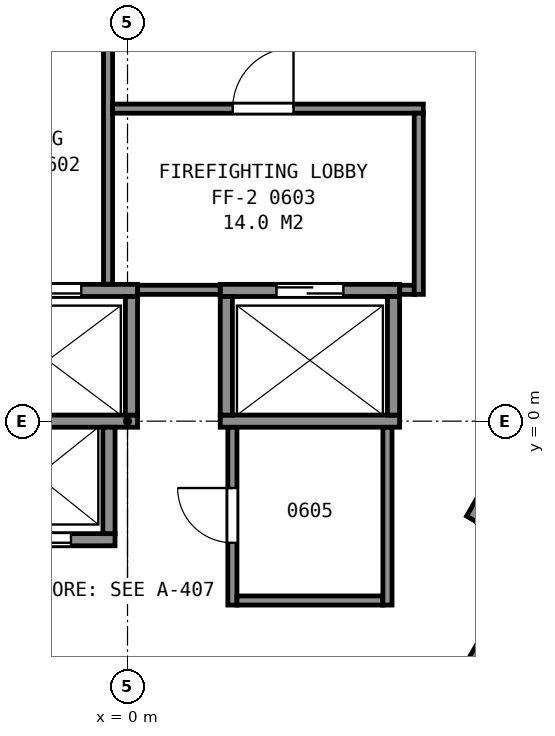
"""IFC4 building model, lengths in metres.
Left out: names, types, materials, properties, quantities, classifications, styles, units other than length and angle.
Written with IfcOpenShell. Run it as: python <this file> out.ifc"""

import sys

from ifc_helpers import new_model, si_unit, direction, frame, frame_2d, origin, place, context, subcontext, project, spatial, rectangle, extrude, element, fill, save


model = new_model("IFC4")
c1 = context("Model", 3, precision=1e-05, world=origin(), true_north=direction((0.0, 1.0)))
c2 = subcontext(c1, "Body", "Model", "MODEL_VIEW")
j1 = project(units=[si_unit("LENGTHUNIT", "METRE"), si_unit("PLANEANGLEUNIT", "RADIAN")], contexts=[c1])
p1 = place(None, origin())
s1 = spatial("IfcSite", under=j1, at=p1, CompositionType="ELEMENT")
p2 = place(p1, origin())
s2 = spatial("IfcBuilding", under=s1, at=p2, CompositionType="ELEMENT")
p3 = place(p2, frame((0.0, 0.0, 36.8)))
s3 = spatial("IfcBuildingStorey", under=s2, at=p3, CompositionType="ELEMENT", Elevation=36.8)
p4 = place(p3, frame((-2.755, -1.95, 0.0), z_axis=(0.0, 0.0, 1.0), x_axis=(1.0, 0.0, 0.0)))
e1 = element("IfcWall", 1, at=p4, inside=s3, PredefinedType="PARTITIONING", context=c2, shape_type="SweptSolid", body=[
    extrude(rectangle(XDim=2.55, YDim=0.2, at=frame_2d((1.275, 0.0))), origin(), (0.0, 0.0, 1.0), 3.6),
])
p5 = place(p4, frame((0.725, 0.0, 0.0)))
e2 = element("IfcOpeningElement", 2, at=p5, cuts=e1, PredefinedType="OPENING", context=c2, shape_type="SweptSolid", body=[
    extrude(rectangle(XDim=1.1, YDim=2.1, at=frame_2d((0.55, 1.05))), frame((0.0, 0.11, 0.0), z_axis=(0.0, -1.0, 0.0), x_axis=(1.0, 0.0, 0.0)), (0.0, 0.0, 1.0), 0.22),
])
p6 = place(p3, frame((-2.785, 0.0, 0.0), z_axis=(0.0, 0.0, 1.0), x_axis=(1.0, 0.0, 0.0)))
e3 = element("IfcWall", 3, at=p6, inside=s3, PredefinedType="PARTITIONING", context=c2, shape_type="SweptSolid", body=[
    extrude(rectangle(XDim=2.95, YDim=0.2, at=frame_2d((1.475, 0.0))), origin(), (0.0, 0.0, 1.0), 3.6),
])
p7 = place(p3, frame((1.525, 0.0, 0.0), z_axis=(0.0, 0.0, 1.0), x_axis=(1.0, 0.0, 0.0)))
e4 = element("IfcWall", 4, at=p7, inside=s3, PredefinedType="PARTITIONING", context=c2, shape_type="SweptSolid", body=[
    extrude(rectangle(XDim=2.95, YDim=0.2, at=frame_2d((1.475, 0.0))), origin(), (0.0, 0.0, 1.0), 3.6),
])
p8 = place(p3, frame((-2.785, 2.15, 0.0), z_axis=(0.0, 0.0, 1.0), x_axis=(1.0, 0.0, 0.0)))
e5 = element("IfcWall", 5, at=p8, inside=s3, PredefinedType="PARTITIONING", context=c2, shape_type="SweptSolid", body=[
    extrude(rectangle(XDim=2.95, YDim=0.2, at=frame_2d((1.475, 0.0))), origin(), (0.0, 0.0, 1.0), 3.6),
])
p9 = place(p8, frame((0.925, 0.0, 0.0)))
e6 = element("IfcOpeningElement", 6, at=p9, cuts=e5, PredefinedType="OPENING", context=c2, shape_type="SweptSolid", body=[
    extrude(rectangle(XDim=1.1, YDim=2.1, at=frame_2d((0.55, 1.05))), frame((0.0, 0.11, 0.0), z_axis=(0.0, -1.0, 0.0), x_axis=(1.0, 0.0, 0.0)), (0.0, 0.0, 1.0), 0.22),
])
p10 = place(p3, frame((1.525, 2.15, 0.0), z_axis=(0.0, 0.0, 1.0), x_axis=(1.0, 0.0, 0.0)))
e7 = element("IfcWall", 7, at=p10, inside=s3, PredefinedType="PARTITIONING", context=c2, shape_type="SweptSolid", body=[
    extrude(rectangle(XDim=2.95, YDim=0.2, at=frame_2d((1.475, 0.0))), origin(), (0.0, 0.0, 1.0), 3.6),
])
p11 = place(p10, frame((0.925, 0.0, 0.0)))
e8 = element("IfcOpeningElement", 8, at=p11, cuts=e7, PredefinedType="OPENING", context=c2, shape_type="SweptSolid", body=[
    extrude(rectangle(XDim=1.1, YDim=2.1, at=frame_2d((0.55, 1.05))), frame((0.0, 0.11, 0.0), z_axis=(0.0, -1.0, 0.0), x_axis=(1.0, 0.0, 0.0)), (0.0, 0.0, 1.0), 0.22),
])
p12 = place(p3, frame((5.527, -4.247, 0.0), z_axis=(0.0, 0.0, 1.0), x_axis=(0.499938297808, 0.866061024631, 0.0)))
e9 = element("IfcWall", 9, at=p12, inside=s3, PredefinedType="PARTITIONING", context=c2, shape_type="SweptSolid", body=[
    extrude(rectangle(XDim=2.35, YDim=0.2, at=frame_2d((1.175, 0.0))), origin(), (0.0, 0.0, 1.0), 3.6),
])
p13 = place(p12, frame((0.725, 0.0, 0.0)))
e10 = element("IfcOpeningElement", 10, at=p13, cuts=e9, PredefinedType="OPENING", context=c2, shape_type="SweptSolid", body=[
    extrude(rectangle(XDim=1.1, YDim=2.1, at=frame_2d((0.55, 1.05))), frame((0.0, 0.11, 0.0), z_axis=(0.0, -1.0, 0.0), x_axis=(1.0, 0.0, 0.0)), (0.0, 0.0, 1.0), 0.22),
])
p14 = place(p3, frame((5.663, -1.612, 0.0), z_axis=(0.0, 0.0, 1.0), x_axis=(0.49998122708, 0.866036242063, 0.0)))
e11 = element("IfcWall", 11, at=p14, inside=s3, PredefinedType="PARTITIONING", context=c2, shape_type="SweptSolid", body=[
    extrude(rectangle(XDim=4.9, YDim=0.2, at=frame_2d((2.45, 0.0))), origin(), (0.0, 0.0, 1.0), 3.6),
])
p15 = place(p14, frame((3.075, 0.0, 0.0)))
e12 = element("IfcOpeningElement", 12, at=p15, cuts=e11, PredefinedType="OPENING", context=c2, shape_type="SweptSolid", body=[
    extrude(rectangle(XDim=1.1, YDim=2.1, at=frame_2d((0.55, 1.05))), frame((0.0, 0.11, 0.0), z_axis=(0.0, -1.0, 0.0), x_axis=(1.0, 0.0, 0.0)), (0.0, 0.0, 1.0), 0.22),
])
p16 = place(p14, frame((0.725, 0.0, 0.0)))
e13 = element("IfcOpeningElement", 13, at=p16, cuts=e11, PredefinedType="OPENING", context=c2, shape_type="SweptSolid", body=[
    extrude(rectangle(XDim=1.1, YDim=2.1, at=frame_2d((0.55, 1.05))), frame((0.0, 0.11, 0.0), z_axis=(0.0, -1.0, 0.0), x_axis=(1.0, 0.0, 0.0)), (0.0, 0.0, 1.0), 0.22),
])
for number, where, z_axis, x_axis in (
    (14, (4.375, 0.1, 0.0), (0.0, 0.0, 1.0), (0.0, 1.0, 0.0)),
    (15, (1.625, 0.1, 0.0), (0.0, 0.0, 1.0), (0.0, 1.0, 0.0)),
    (16, (0.065, 0.1, 0.0), (0.0, 0.0, 1.0), (0.0, 1.0, 0.0)),
):
    element("IfcWall", number, at=place(p3, frame(where, z_axis=z_axis, x_axis=x_axis)), inside=s3, PredefinedType="PARTITIONING", context=c2, shape_type="SweptSolid", body=[
        extrude(rectangle(XDim=1.95, YDim=0.2, at=frame_2d((0.975, 0.0))), origin(), (0.0, 0.0, 1.0), 3.6),
    ])
p17 = place(p3, frame((-0.305, -1.85, 0.0), z_axis=(0.0, 0.0, 1.0), x_axis=(0.0, 1.0, 0.0)))
e17 = element("IfcWall", 17, at=p17, inside=s3, PredefinedType="PARTITIONING", context=c2, shape_type="SweptSolid", body=[
    extrude(rectangle(XDim=1.75, YDim=0.2, at=frame_2d((0.875, 0.0))), origin(), (0.0, 0.0, 1.0), 3.6),
])
p18 = place(p3, frame((-0.32, 2.252, 0.0), z_axis=(0.0, 0.0, 1.0), x_axis=(0.0, 1.0, 0.0)))
e18 = element("IfcWall", 18, at=p18, inside=s3, PredefinedType="PARTITIONING", context=c2, shape_type="SweptSolid", body=[
    extrude(rectangle(XDim=4.063, YDim=0.15, at=frame_2d((2.031, 0.0))), origin(), (0.0, 0.0, 1.0), 3.35),
])
p19 = place(p3, frame((-0.245, 5.14, 0.0), z_axis=(0.0, 0.0, 1.0), x_axis=(1.0, 0.0, 0.0)))
e19 = element("IfcWall", 19, at=p19, inside=s3, PredefinedType="PARTITIONING", context=c2, shape_type="SweptSolid", body=[
    extrude(rectangle(XDim=5.11, YDim=0.15, at=frame_2d((2.555, 0.0))), origin(), (0.0, 0.0, 1.0), 3.35),
])
p20 = place(p19, frame((1.975, 0.0, 0.0)))
e20 = element("IfcOpeningElement", 20, at=p20, cuts=e19, PredefinedType="OPENING", context=c2, shape_type="SweptSolid", body=[
    extrude(rectangle(XDim=1.0, YDim=2.1, at=frame_2d((0.5, 1.05))), frame((0.0, 0.085, 0.0), z_axis=(0.0, -1.0, 0.0), x_axis=(1.0, 0.0, 0.0)), (0.0, 0.0, 1.0), 0.17),
])
p21 = place(p3, frame((0.167, 2.16, 0.0), z_axis=(0.0, 0.0, 1.0), x_axis=(1.0, 0.0, 0.0)))
e21 = element("IfcWall", 21, at=p21, inside=s3, PredefinedType="PARTITIONING", context=c2, shape_type="SweptSolid", body=[
    extrude(rectangle(XDim=1.356, YDim=0.15, at=frame_2d((0.678, 0.0))), origin(), (0.0, 0.0, 1.0), 3.35),
])
p22 = place(p3, frame((1.725, -0.102, 0.0), z_axis=(0.0, 0.0, 1.0), x_axis=(0.0, -1.0, 0.0)))
e22 = element("IfcWall", 22, at=p22, inside=s3, PredefinedType="PARTITIONING", context=c2, shape_type="SweptSolid", body=[
    extrude(rectangle(XDim=2.923, YDim=0.15, at=frame_2d((1.461, 0.0))), origin(), (0.0, 0.0, 1.0), 3.35),
])
p23 = place(p22, frame((0.998, 0.0, 0.0)))
e23 = element("IfcOpeningElement", 23, at=p23, cuts=e22, PredefinedType="OPENING", context=c2, shape_type="SweptSolid", body=[
    extrude(rectangle(XDim=0.9, YDim=2.1, at=frame_2d((0.45, 1.05))), frame((0.0, 0.085, 0.0), z_axis=(0.0, -1.0, 0.0), x_axis=(1.0, 0.0, 0.0)), (0.0, 0.0, 1.0), 0.17),
])
p24 = place(p3, frame((1.8, -2.95, 0.0), z_axis=(0.0, 0.0, 1.0), x_axis=(1.0, 0.0, 0.0)))
e24 = element("IfcWall", 24, at=p24, inside=s3, PredefinedType="PARTITIONING", context=c2, shape_type="SweptSolid", body=[
    extrude(rectangle(XDim=2.4, YDim=0.15, at=frame_2d((1.2, 0.0))), origin(), (0.0, 0.0, 1.0), 3.35),
])
p25 = place(p3, frame((4.275, -3.025, 0.0), z_axis=(0.0, 0.0, 1.0), x_axis=(0.0, 1.0, 0.0)))
e25 = element("IfcWall", 25, at=p25, inside=s3, PredefinedType="PARTITIONING", context=c2, shape_type="SweptSolid", body=[
    extrude(rectangle(XDim=2.923, YDim=0.15, at=frame_2d((1.461, 0.0))), origin(), (0.0, 0.0, 1.0), 3.35),
])
p26 = place(p3, frame((4.477, 2.16, 0.0), z_axis=(0.0, 0.0, 1.0), x_axis=(1.0, 0.0, 0.0)))
e26 = element("IfcWall", 26, at=p26, inside=s3, PredefinedType="PARTITIONING", context=c2, shape_type="SweptSolid", body=[
    extrude(rectangle(XDim=0.238, YDim=0.15, at=frame_2d((0.119, 0.0))), origin(), (0.0, 0.0, 1.0), 3.35),
])
p27 = place(p3, frame((4.79, 2.085, 0.0), z_axis=(0.0, 0.0, 1.0), x_axis=(0.0, 1.0, 0.0)))
e27 = element("IfcWall", 27, at=p27, inside=s3, PredefinedType="PARTITIONING", context=c2, shape_type="SweptSolid", body=[
    extrude(rectangle(XDim=2.98, YDim=0.15, at=frame_2d((1.49, 0.0))), origin(), (0.0, 0.0, 1.0), 3.35),
])
p28 = place(p3, frame((16.967, 5.906, 0.0), z_axis=(0.0, 0.0, 1.0), x_axis=(-0.500024758804, -0.866011108811, 0.0)))
e28 = element("IfcWall", 28, at=p28, inside=s3, PredefinedType="PARTITIONING", context=c2, shape_type="SweptSolid", body=[
    extrude(rectangle(XDim=26.402, YDim=0.125, at=frame_2d((13.201, 0.0))), origin(), (0.0, 0.0, 1.0), 2.613),
])
p29 = place(p28, frame((21.332, 0.0, 0.0)))
e29 = element("IfcOpeningElement", 29, at=p29, cuts=e28, PredefinedType="OPENING", context=c2, shape_type="SweptSolid", body=[
    extrude(rectangle(XDim=1.2, YDim=2.1, at=frame_2d((0.6, 1.05))), frame((0.0, 0.073, 0.0), z_axis=(0.0, -1.0, 0.0), x_axis=(1.0, 0.0, 0.0)), (0.0, 0.0, 1.0), 0.145),
])
p30 = place(p28, frame((15.801, 0.0, 0.0)))
e30 = element("IfcOpeningElement", 30, at=p30, cuts=e28, PredefinedType="OPENING", context=c2, shape_type="SweptSolid", body=[
    extrude(rectangle(XDim=1.0, YDim=2.1, at=frame_2d((0.5, 1.05))), frame((0.0, 0.073, 0.0), z_axis=(0.0, -1.0, 0.0), x_axis=(1.0, 0.0, 0.0)), (0.0, 0.0, 1.0), 0.145),
])
p31 = place(p28, frame((9.642, 0.0, 0.0)))
e31 = element("IfcOpeningElement", 31, at=p31, cuts=e28, PredefinedType="OPENING", context=c2, shape_type="SweptSolid", body=[
    extrude(rectangle(XDim=1.0, YDim=2.1, at=frame_2d((0.5, 1.05))), frame((0.0, 0.073, 0.0), z_axis=(0.0, -1.0, 0.0), x_axis=(1.0, 0.0, 0.0)), (0.0, 0.0, 1.0), 0.145),
])
p32 = place(p28, frame((2.839, 0.0, 0.0)))
e32 = element("IfcOpeningElement", 32, at=p32, cuts=e28, PredefinedType="OPENING", context=c2, shape_type="SweptSolid", body=[
    extrude(rectangle(XDim=1.0, YDim=2.1, at=frame_2d((0.5, 1.05))), frame((0.0, 0.073, 0.0), z_axis=(0.0, -1.0, 0.0), x_axis=(1.0, 0.0, 0.0)), (0.0, 0.0, 1.0), 0.145),
])
p33 = place(p5, origin())
e33 = element("IfcDoor", 33, at=p33, inside=s3, OperationType="SLIDING_TO_RIGHT", PredefinedType="DOOR", context=c2, shape_type="SweptSolid", body=[
    extrude(rectangle(XDim=1.1, YDim=2.1, at=frame_2d((0.55, 1.05))), frame((0.0, 0.025, 0.0), z_axis=(0.0, -1.0, 0.0), x_axis=(1.0, 0.0, 0.0)), (0.0, 0.0, 1.0), 0.05),
])
fill(e2, e33)
p34 = place(p9, origin())
e34 = element("IfcDoor", 34, at=p34, inside=s3, OperationType="SLIDING_TO_LEFT", PredefinedType="DOOR", context=c2, shape_type="SweptSolid", body=[
    extrude(rectangle(XDim=1.1, YDim=2.1, at=frame_2d((0.55, 1.05))), frame((0.0, 0.025, 0.0), z_axis=(0.0, -1.0, 0.0), x_axis=(1.0, 0.0, 0.0)), (0.0, 0.0, 1.0), 0.05),
])
fill(e6, e34)
p35 = place(p11, origin())
e35 = element("IfcDoor", 35, at=p35, inside=s3, OperationType="SLIDING_TO_RIGHT", PredefinedType="DOOR", context=c2, shape_type="SweptSolid", body=[
    extrude(rectangle(XDim=1.1, YDim=2.1, at=frame_2d((0.55, 1.05))), frame((0.0, 0.025, 0.0), z_axis=(0.0, -1.0, 0.0), x_axis=(1.0, 0.0, 0.0)), (0.0, 0.0, 1.0), 0.05),
])
fill(e8, e35)
p36 = place(p20, origin())
e36 = element("IfcDoor", 36, at=p36, inside=s3, OperationType="SINGLE_SWING_RIGHT", PredefinedType="DOOR", context=c2, shape_type="SweptSolid", body=[
    extrude(rectangle(XDim=1.0, YDim=2.1, at=frame_2d((0.5, 1.05))), frame((0.0, 0.025, 0.0), z_axis=(0.0, -1.0, 0.0), x_axis=(1.0, 0.0, 0.0)), (0.0, 0.0, 1.0), 0.05),
])
fill(e20, e36)
p37 = place(p23, origin())
e37 = element("IfcDoor", 37, at=p37, inside=s3, OperationType="SINGLE_SWING_LEFT", PredefinedType="DOOR", context=c2, shape_type="SweptSolid", body=[
    extrude(rectangle(XDim=0.9, YDim=2.1, at=frame_2d((0.45, 1.05))), frame((0.0, 0.025, 0.0), z_axis=(0.0, -1.0, 0.0), x_axis=(1.0, 0.0, 0.0)), (0.0, 0.0, 1.0), 0.05),
])
fill(e23, e37)
save(model, sys.argv[1])
